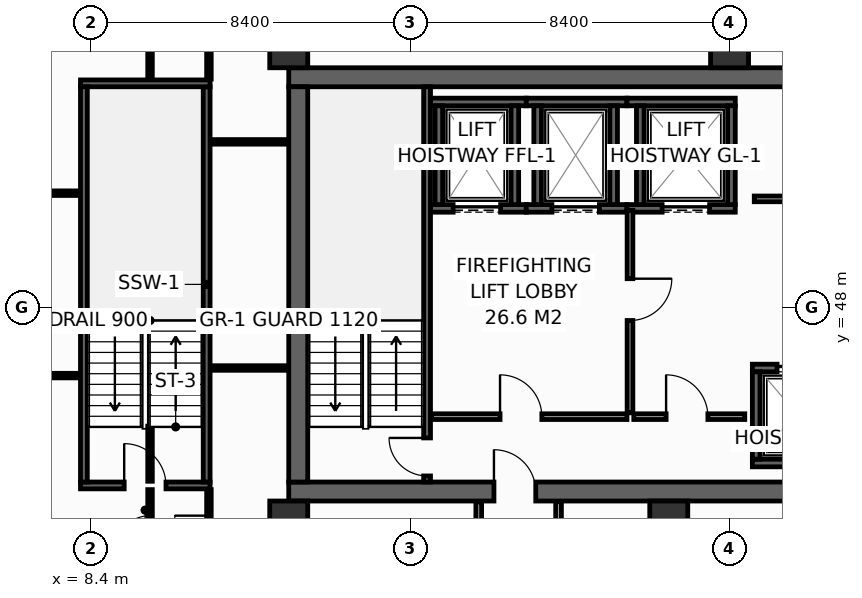
"""IFC4 building model, lengths in metres.
Left out: names, types, materials, properties, quantities, classifications, styles, units other than length and angle.
Written with IfcOpenShell. Run it as: python <this file> out.ifc"""

import sys

from ifc_helpers import new_model, si_unit, direction, frame, frame_2d, origin, origin_2d, place, context, subcontext, project, spatial, rectangle, hollow_rectangle, extrude, element, fill, save


model = new_model("IFC4")
c1 = context("Model", 3, precision=1e-05, world=origin(), true_north=direction((0.0, 1.0)))
c2 = subcontext(c1, "Body", "Model", "MODEL_VIEW")
j1 = project(units=[si_unit("LENGTHUNIT", "METRE"), si_unit("PLANEANGLEUNIT", "RADIAN")], contexts=[c1])
p1 = place(None, origin())
s1 = spatial("IfcSite", under=j1, at=p1, CompositionType="ELEMENT")
p2 = place(p1, origin())
s2 = spatial("IfcBuilding", under=s1, at=p2, CompositionType="ELEMENT")
p3 = place(p2, frame((0.0, 0.0, 160.0)))
s3 = spatial("IfcBuildingStorey", under=s2, at=p3, CompositionType="ELEMENT", Elevation=160.0)
p4 = place(p3, frame((13.6, 43.15, 0.0), z_axis=(0.0, 0.0, 1.0), x_axis=(1.0, 0.0, 0.0)))
e1 = element("IfcWall", 1, at=p4, inside=s3, PredefinedType="SHEAR", context=c2, shape_type="SweptSolid", body=[
    extrude(rectangle(XDim=32.7, YDim=0.5, at=frame_2d((16.35, 0.0))), origin(), (0.0, 0.0, 1.0), 3.55),
])
p5 = place(p4, frame((5.4, 0.0, 0.0)))
e2 = element("IfcOpeningElement", 2, at=p5, cuts=e1, PredefinedType="OPENING", context=c2, shape_type="SweptSolid", body=[
    extrude(rectangle(XDim=1.1, YDim=2.15, at=frame_2d((0.55, 1.075))), frame((0.0, 0.26, 0.0), z_axis=(0.0, -1.0, 0.0), x_axis=(1.0, 0.0, 0.0)), (0.0, 0.0, 1.0), 0.52),
])
p6 = place(p4, frame((25.6, 0.0, 0.0)))
e3 = element("IfcOpeningElement", 3, at=p6, cuts=e1, PredefinedType="OPENING", context=c2, shape_type="SweptSolid", body=[
    extrude(rectangle(XDim=1.1, YDim=2.15, at=frame_2d((0.55, 1.075))), frame((0.0, 0.26, 0.0), z_axis=(0.0, -1.0, 0.0), x_axis=(1.0, 0.0, 0.0)), (0.0, 0.0, 1.0), 0.52),
])
p7 = place(p3, frame((13.6, 54.05, 0.0), z_axis=(0.0, 0.0, 1.0), x_axis=(1.0, 0.0, 0.0)))
e4 = element("IfcWall", 4, at=p7, inside=s3, PredefinedType="SHEAR", context=c2, shape_type="SweptSolid", body=[
    extrude(rectangle(XDim=32.7, YDim=0.5, at=frame_2d((16.35, 0.0))), origin(), (0.0, 0.0, 1.0), 3.55),
])
p8 = place(p3, frame((13.85, 43.4, 0.0), z_axis=(0.0, 0.0, 1.0), x_axis=(0.0, 1.0, 0.0)))
e5 = element("IfcWall", 5, at=p8, inside=s3, PredefinedType="SHEAR", context=c2, shape_type="SweptSolid", body=[
    extrude(rectangle(XDim=10.4, YDim=0.5, at=frame_2d((5.2, 0.0))), origin(), (0.0, 0.0, 1.0), 3.55),
])
for number, where, z_axis, x_axis in (
    (6, (13.6, 54.8, 0.0), (0.0, 0.0, 1.0), (1.0, 0.0, 0.0)),
    (7, (25.2, 54.8, 0.0), (0.0, 0.0, 1.0), (1.0, 0.0, 0.0)),
    (8, (13.6, 42.4, 0.0), (0.0, 0.0, 1.0), (1.0, 0.0, 0.0)),
    (9, (23.6, 42.4, 0.0), (0.0, 0.0, 1.0), (1.0, 0.0, 0.0)),
):
    element("IfcColumn", number, at=place(p3, frame(where, z_axis=z_axis, x_axis=x_axis)), inside=s3, PredefinedType="COLUMN", context=c2, shape_type="SweptSolid", body=[
        extrude(hollow_rectangle(XDim=1.0, YDim=1.0, WallThickness=0.045, at=origin_2d()), origin(), (0.0, 0.0, 1.0), 3.8),
    ])
p9 = place(p3, frame((17.33, 50.6, 0.0), z_axis=(0.0, 0.0, 1.0), x_axis=(1.0, 0.0, 0.0)))
e10 = element("IfcWall", 10, at=p9, inside=s3, PredefinedType="SHEAR", context=c2, shape_type="SweptSolid", body=[
    extrude(rectangle(XDim=2.52, YDim=0.2, at=frame_2d((1.26, 0.0))), origin(), (0.0, 0.0, 1.0), 3.55),
])
p10 = place(p9, frame((0.595, 0.0, 0.0)))
e11 = element("IfcOpeningElement", 11, at=p10, cuts=e10, PredefinedType="OPENING", context=c2, shape_type="SweptSolid", body=[
    extrude(rectangle(XDim=1.25, YDim=2.3, at=frame_2d((0.625, 1.15))), frame((0.0, 0.11, 0.0), z_axis=(0.0, -1.0, 0.0), x_axis=(1.0, 0.0, 0.0)), (0.0, 0.0, 1.0), 0.22),
])
p11 = place(p3, frame((17.33, 53.4, 0.0), z_axis=(0.0, 0.0, 1.0), x_axis=(1.0, 0.0, 0.0)))
e12 = element("IfcWall", 12, at=p11, inside=s3, PredefinedType="SHEAR", context=c2, shape_type="SweptSolid", body=[
    extrude(rectangle(XDim=2.52, YDim=0.2, at=frame_2d((1.26, 0.0))), origin(), (0.0, 0.0, 1.0), 3.55),
])
for number, where, z_axis, x_axis in (
    (13, (17.55, 50.7, 0.0), (0.0, 0.0, 1.0), (0.0, 1.0, 0.0)),
    (14, (19.55, 50.7, 0.0), (0.0, 0.0, 1.0), (0.0, 1.0, 0.0)),
):
    element("IfcWall", number, at=place(p3, frame(where, z_axis=z_axis, x_axis=x_axis)), inside=s3, PredefinedType="SHEAR", context=c2, shape_type="SweptSolid", body=[
        extrude(rectangle(XDim=2.6, YDim=0.2, at=frame_2d((1.3, 0.0))), origin(), (0.0, 0.0, 1.0), 3.55),
    ])
p12 = place(p3, frame((19.85, 50.6, 0.0), z_axis=(0.0, 0.0, 1.0), x_axis=(1.0, 0.0, 0.0)))
e15 = element("IfcWall", 15, at=p12, inside=s3, PredefinedType="SHEAR", context=c2, shape_type="SweptSolid", body=[
    extrude(rectangle(XDim=2.65, YDim=0.2, at=frame_2d((1.325, 0.0))), origin(), (0.0, 0.0, 1.0), 3.55),
])
p13 = place(p12, frame((0.675, 0.0, 0.0)))
e16 = element("IfcOpeningElement", 16, at=p13, cuts=e15, PredefinedType="OPENING", context=c2, shape_type="SweptSolid", body=[
    extrude(rectangle(XDim=1.25, YDim=2.3, at=frame_2d((0.625, 1.15))), frame((0.0, 0.11, 0.0), z_axis=(0.0, -1.0, 0.0), x_axis=(1.0, 0.0, 0.0)), (0.0, 0.0, 1.0), 0.22),
])
p14 = place(p3, frame((19.85, 53.4, 0.0), z_axis=(0.0, 0.0, 1.0), x_axis=(1.0, 0.0, 0.0)))
e17 = element("IfcWall", 17, at=p14, inside=s3, PredefinedType="SHEAR", context=c2, shape_type="SweptSolid", body=[
    extrude(rectangle(XDim=2.65, YDim=0.2, at=frame_2d((1.325, 0.0))), origin(), (0.0, 0.0, 1.0), 3.55),
])
for number, where, z_axis, x_axis in (
    (18, (20.15, 50.7, 0.0), (0.0, 0.0, 1.0), (0.0, 1.0, 0.0)),
    (19, (22.15, 50.7, 0.0), (0.0, 0.0, 1.0), (0.0, 1.0, 0.0)),
):
    element("IfcWall", number, at=place(p3, frame(where, z_axis=z_axis, x_axis=x_axis)), inside=s3, PredefinedType="SHEAR", context=c2, shape_type="SweptSolid", body=[
        extrude(rectangle(XDim=2.6, YDim=0.2, at=frame_2d((1.3, 0.0))), origin(), (0.0, 0.0, 1.0), 3.55),
    ])
p15 = place(p3, frame((22.5, 50.6, 0.0), z_axis=(0.0, 0.0, 1.0), x_axis=(1.0, 0.0, 0.0)))
e20 = element("IfcWall", 20, at=p15, inside=s3, PredefinedType="SHEAR", context=c2, shape_type="SweptSolid", body=[
    extrude(rectangle(XDim=2.85, YDim=0.2, at=frame_2d((1.425, 0.0))), origin(), (0.0, 0.0, 1.0), 3.55),
])
p16 = place(p15, frame((0.925, 0.0, 0.0)))
e21 = element("IfcOpeningElement", 21, at=p16, cuts=e20, PredefinedType="OPENING", context=c2, shape_type="SweptSolid", body=[
    extrude(rectangle(XDim=1.25, YDim=2.3, at=frame_2d((0.625, 1.15))), frame((0.0, 0.11, 0.0), z_axis=(0.0, -1.0, 0.0), x_axis=(1.0, 0.0, 0.0)), (0.0, 0.0, 1.0), 0.22),
])
p17 = place(p3, frame((22.5, 53.4, 0.0), z_axis=(0.0, 0.0, 1.0), x_axis=(1.0, 0.0, 0.0)))
e22 = element("IfcWall", 22, at=p17, inside=s3, PredefinedType="SHEAR", context=c2, shape_type="SweptSolid", body=[
    extrude(rectangle(XDim=2.85, YDim=0.2, at=frame_2d((1.425, 0.0))), origin(), (0.0, 0.0, 1.0), 3.55),
])
for number, where, z_axis, x_axis in (
    (23, (22.85, 50.7, 0.0), (0.0, 0.0, 1.0), (0.0, 1.0, 0.0)),
    (24, (25.25, 50.7, 0.0), (0.0, 0.0, 1.0), (0.0, 1.0, 0.0)),
):
    element("IfcWall", number, at=place(p3, frame(where, z_axis=z_axis, x_axis=x_axis)), inside=s3, PredefinedType="SHEAR", context=c2, shape_type="SweptSolid", body=[
        extrude(rectangle(XDim=2.6, YDim=0.2, at=frame_2d((1.3, 0.0))), origin(), (0.0, 0.0, 1.0), 3.55),
    ])
p18 = place(p3, frame((25.8, 43.9, 0.0), z_axis=(0.0, 0.0, 1.0), x_axis=(1.0, 0.0, 0.0)))
e25 = element("IfcWall", 25, at=p18, inside=s3, PredefinedType="SHEAR", context=c2, shape_type="SweptSolid", body=[
    extrude(rectangle(XDim=2.575, YDim=0.2, at=frame_2d((1.288, 0.0))), origin(), (0.0, 0.0, 1.0), 3.55),
])
p19 = place(p3, frame((25.8, 46.4, 0.0), z_axis=(0.0, 0.0, 1.0), x_axis=(1.0, 0.0, 0.0)))
e26 = element("IfcWall", 26, at=p19, inside=s3, PredefinedType="SHEAR", context=c2, shape_type="SweptSolid", body=[
    extrude(rectangle(XDim=2.575, YDim=0.2, at=frame_2d((1.288, 0.0))), origin(), (0.0, 0.0, 1.0), 3.55),
])
p20 = place(p19, frame((0.65, 0.0, 0.0)))
e27 = element("IfcOpeningElement", 27, at=p20, cuts=e26, PredefinedType="OPENING", context=c2, shape_type="SweptSolid", body=[
    extrude(rectangle(XDim=1.1, YDim=2.2, at=frame_2d((0.55, 1.1))), frame((0.0, 0.11, 0.0), z_axis=(0.0, -1.0, 0.0), x_axis=(1.0, 0.0, 0.0)), (0.0, 0.0, 1.0), 0.22),
])
p21 = place(p3, frame((25.9, 44.0, 0.0), z_axis=(0.0, 0.0, 1.0), x_axis=(0.0, 1.0, 0.0)))
e28 = element("IfcWall", 28, at=p21, inside=s3, PredefinedType="SHEAR", context=c2, shape_type="SweptSolid", body=[
    extrude(rectangle(XDim=2.3, YDim=0.2, at=frame_2d((1.15, 0.0))), origin(), (0.0, 0.0, 1.0), 3.55),
])
p22 = place(p3, frame((17.24, 43.4, 0.0), z_axis=(0.0, 0.0, 1.0), x_axis=(0.0, 1.0, 0.0)))
e29 = element("IfcWall", 29, at=p22, inside=s3, PredefinedType="SHEAR", context=c2, shape_type="SweptSolid", body=[
    extrude(rectangle(XDim=10.4, YDim=0.18, at=frame_2d((5.2, 0.0))), origin(), (0.0, 0.0, 1.0), 3.55),
])
p23 = place(p22, frame((0.16, 0.0, 0.0)))
e30 = element("IfcOpeningElement", 30, at=p23, cuts=e29, PredefinedType="OPENING", context=c2, shape_type="SweptSolid", body=[
    extrude(rectangle(XDim=1.0, YDim=2.15, at=frame_2d((0.5, 1.075))), frame((0.0, 0.1, 0.0), z_axis=(0.0, -1.0, 0.0), x_axis=(1.0, 0.0, 0.0)), (0.0, 0.0, 1.0), 0.2),
])
p24 = place(p3, frame((8.12, 43.31, 0.0), z_axis=(0.0, 0.0, 1.0), x_axis=(1.0, 0.0, 0.0)))
e31 = element("IfcWall", 31, at=p24, inside=s3, PredefinedType="SHEAR", context=c2, shape_type="SweptSolid", body=[
    extrude(rectangle(XDim=3.41, YDim=0.18, at=frame_2d((1.705, 0.0))), origin(), (0.0, 0.0, 1.0), 3.55),
])
p25 = place(p24, frame((1.15, 0.0, 0.0)))
e32 = element("IfcOpeningElement", 32, at=p25, cuts=e31, PredefinedType="OPENING", context=c2, shape_type="SweptSolid", body=[
    extrude(rectangle(XDim=1.1, YDim=2.15, at=frame_2d((0.55, 1.075))), frame((0.0, 0.1, 0.0), z_axis=(0.0, -1.0, 0.0), x_axis=(1.0, 0.0, 0.0)), (0.0, 0.0, 1.0), 0.2),
])
p26 = place(p3, frame((11.44, 43.4, 0.0), z_axis=(0.0, 0.0, 1.0), x_axis=(0.0, 1.0, 0.0)))
e33 = element("IfcWall", 33, at=p26, inside=s3, PredefinedType="SHEAR", context=c2, shape_type="SweptSolid", body=[
    extrude(rectangle(XDim=10.4, YDim=0.18, at=frame_2d((5.2, 0.0))), origin(), (0.0, 0.0, 1.0), 3.55),
])
p27 = place(p3, frame((11.53, 53.89, 0.0), z_axis=(0.0, 0.0, 1.0), x_axis=(-1.0, 0.0, 0.0)))
e34 = element("IfcWall", 34, at=p27, inside=s3, PredefinedType="SHEAR", context=c2, shape_type="SweptSolid", body=[
    extrude(rectangle(XDim=3.41, YDim=0.18, at=frame_2d((1.705, 0.0))), origin(), (0.0, 0.0, 1.0), 3.55),
])
p28 = place(p3, frame((8.21, 53.8, 0.0), z_axis=(0.0, 0.0, 1.0), x_axis=(0.0, -1.0, 0.0)))
e35 = element("IfcWall", 35, at=p28, inside=s3, PredefinedType="SHEAR", context=c2, shape_type="SweptSolid", body=[
    extrude(rectangle(XDim=10.4, YDim=0.18, at=frame_2d((5.2, 0.0))), origin(), (0.0, 0.0, 1.0), 3.55),
])
p29 = place(p3, frame((17.36, 45.12, 0.0), z_axis=(0.0, 0.0, 1.0), x_axis=(1.0, 0.0, 0.0)))
e36 = element("IfcWall", 36, at=p29, inside=s3, PredefinedType="PARTITIONING", context=c2, shape_type="SweptSolid", body=[
    extrude(rectangle(XDim=5.14, YDim=0.15, at=frame_2d((2.57, 0.0))), origin(), (0.0, 0.0, 1.0), 3.55),
])
p30 = place(p29, frame((1.8, 0.0, 0.0)))
e37 = element("IfcOpeningElement", 37, at=p30, cuts=e36, PredefinedType="OPENING", context=c2, shape_type="SweptSolid", body=[
    extrude(rectangle(XDim=1.1, YDim=2.15, at=frame_2d((0.55, 1.075))), frame((0.0, 0.085, 0.0), z_axis=(0.0, -1.0, 0.0), x_axis=(1.0, 0.0, 0.0)), (0.0, 0.0, 1.0), 0.17),
])
p31 = place(p3, frame((22.58, 50.55, 0.0), z_axis=(0.0, 0.0, 1.0), x_axis=(0.0, -1.0, 0.0)))
e38 = element("IfcWall", 38, at=p31, inside=s3, PredefinedType="PARTITIONING", context=c2, shape_type="SweptSolid", body=[
    extrude(rectangle(XDim=5.33, YDim=0.15, at=frame_2d((2.665, 0.0))), origin(), (0.0, 0.0, 1.0), 3.55),
])
p32 = place(p31, frame((1.8, 0.0, 0.0)))
e39 = element("IfcOpeningElement", 39, at=p32, cuts=e38, PredefinedType="OPENING", context=c2, shape_type="SweptSolid", body=[
    extrude(rectangle(XDim=1.1, YDim=2.15, at=frame_2d((0.55, 1.075))), frame((0.0, 0.085, 0.0), z_axis=(0.0, -1.0, 0.0), x_axis=(1.0, 0.0, 0.0)), (0.0, 0.0, 1.0), 0.17),
])
p33 = place(p3, frame((22.68, 45.12, 0.0), z_axis=(0.0, 0.0, 1.0), x_axis=(1.0, 0.0, 0.0)))
e40 = element("IfcWall", 40, at=p33, inside=s3, PredefinedType="PARTITIONING", context=c2, shape_type="SweptSolid", body=[
    extrude(rectangle(XDim=2.92, YDim=0.15, at=frame_2d((1.46, 0.0))), origin(), (0.0, 0.0, 1.0), 3.55),
])
p34 = place(p33, frame((0.85, 0.0, 0.0)))
e41 = element("IfcOpeningElement", 41, at=p34, cuts=e40, PredefinedType="OPENING", context=c2, shape_type="SweptSolid", body=[
    extrude(rectangle(XDim=1.1, YDim=2.15, at=frame_2d((0.55, 1.075))), frame((0.0, 0.085, 0.0), z_axis=(0.0, -1.0, 0.0), x_axis=(1.0, 0.0, 0.0)), (0.0, 0.0, 1.0), 0.17),
])
p35 = place(p3, frame((25.85, 50.85, 0.0), z_axis=(0.0, 0.0, 1.0), x_axis=(1.0, 0.0, 0.0)))
e42 = element("IfcWall", 42, at=p35, inside=s3, PredefinedType="PARTITIONING", context=c2, shape_type="SweptSolid", body=[
    extrude(rectangle(XDim=7.65, YDim=0.15, at=frame_2d((3.825, 0.0))), origin(), (0.0, 0.0, 1.0), 3.55),
])
p36 = place(p35, frame((1.25, 0.0, 0.0)))
e43 = element("IfcOpeningElement", 43, at=p36, cuts=e42, PredefinedType="OPENING", context=c2, shape_type="SweptSolid", body=[
    extrude(rectangle(XDim=0.95, YDim=2.15, at=frame_2d((0.475, 1.075))), frame((0.0, 0.085, 0.0), z_axis=(0.0, -1.0, 0.0), x_axis=(1.0, 0.0, 0.0)), (0.0, 0.0, 1.0), 0.17),
])
p37 = place(p3, frame((11.55, 52.35, 0.0), z_axis=(0.0, 0.0, 1.0), x_axis=(1.0, 0.0, 0.0)))
e44 = element("IfcWall", 44, at=p37, inside=s3, PredefinedType="PARTITIONING", context=c2, shape_type="SweptSolid", body=[
    extrude(rectangle(XDim=2.03, YDim=0.12, at=frame_2d((1.015, 0.0))), origin(), (0.0, 0.0, 1.0), 3.55),
])
p38 = place(p3, frame((11.5, 54.0, 0.0), z_axis=(0.0, 0.0, 1.0), x_axis=(0.0, 1.0, 0.0)))
e45 = element("IfcWall", 45, at=p38, inside=s3, PredefinedType="PARTITIONING", context=c2, shape_type="SweptSolid", body=[
    extrude(rectangle(XDim=1.995, YDim=0.12, at=frame_2d((0.998, 0.0))), origin(), (0.0, 0.0, 1.0), 2.935),
])
p39 = place(p3, frame((5.102, 46.2, 0.0), z_axis=(0.0, 0.0, 1.0), x_axis=(1.0, 0.0, 0.0)))
e46 = element("IfcWall", 46, at=p39, inside=s3, PredefinedType="PARTITIONING", context=c2, shape_type="SweptSolid", body=[
    extrude(rectangle(XDim=2.998, YDim=0.12, at=frame_2d((1.499, 0.0))), origin(), (0.0, 0.0, 1.0), 2.835),
])
p40 = place(p3, frame((4.304, 51.0, 0.0), z_axis=(0.0, 0.0, 1.0), x_axis=(1.0, 0.0, 0.0)))
e47 = element("IfcWall", 47, at=p40, inside=s3, PredefinedType="PARTITIONING", context=c2, shape_type="SweptSolid", body=[
    extrude(rectangle(XDim=3.796, YDim=0.12, at=frame_2d((1.898, 0.0))), origin(), (0.0, 0.0, 1.0), 2.835),
])
p41 = place(p3, frame((9.95, 40.93, 0.0), z_axis=(0.0, 0.0, 1.0), x_axis=(0.0, 1.0, 0.0)))
e48 = element("IfcWall", 48, at=p41, inside=s3, PredefinedType="PARTITIONING", context=c2, shape_type="SweptSolid", body=[
    extrude(rectangle(XDim=2.27, YDim=0.12, at=frame_2d((1.135, 0.0))), origin(), (0.0, 0.0, 1.0), 2.835),
])
p42 = place(p41, frame((0.685, 0.0, 0.0)))
e49 = element("IfcOpeningElement", 49, at=p42, cuts=e48, PredefinedType="OPENING", context=c2, shape_type="SweptSolid", body=[
    extrude(rectangle(XDim=0.9, YDim=2.1, at=frame_2d((0.45, 1.05))), frame((0.0, 0.07, 0.0), z_axis=(0.0, -1.0, 0.0), x_axis=(1.0, 0.0, 0.0)), (0.0, 0.0, 1.0), 0.14),
])
p43 = place(p3, frame((9.95, 43.42, 0.0), z_axis=(0.0, 0.0, 1.0), x_axis=(0.0, 1.0, 0.0)))
e50 = element("IfcWall", 50, at=p43, inside=s3, PredefinedType="PARTITIONING", context=c2, shape_type="SweptSolid", body=[
    extrude(rectangle(XDim=1.45, YDim=0.12, at=frame_2d((0.725, 0.0))), origin(), (0.0, 0.0, 1.0), 3.55),
])
p44 = place(p3, frame((9.95, 54.0, 0.0), z_axis=(0.0, 0.0, 1.0), x_axis=(0.0, 1.0, 0.0)))
e51 = element("IfcWall", 51, at=p44, inside=s3, PredefinedType="PARTITIONING", context=c2, shape_type="SweptSolid", body=[
    extrude(rectangle(XDim=1.995, YDim=0.12, at=frame_2d((0.998, 0.0))), origin(), (0.0, 0.0, 1.0), 2.935),
])
p45 = place(p3, frame((11.55, 46.4, 0.0), z_axis=(0.0, 0.0, 1.0), x_axis=(1.0, 0.0, 0.0)))
e52 = element("IfcWall", 52, at=p45, inside=s3, PredefinedType="PARTITIONING", context=c2, shape_type="SweptSolid", body=[
    extrude(rectangle(XDim=2.03, YDim=0.12, at=frame_2d((1.015, 0.0))), origin(), (0.0, 0.0, 1.0), 3.55),
])
p46 = place(p3, frame((11.5, 40.93, 0.0), z_axis=(0.0, 0.0, 1.0), x_axis=(0.0, 1.0, 0.0)))
e53 = element("IfcWall", 53, at=p46, inside=s3, PredefinedType="PARTITIONING", context=c2, shape_type="SweptSolid", body=[
    extrude(rectangle(XDim=2.27, YDim=0.12, at=frame_2d((1.135, 0.0))), origin(), (0.0, 0.0, 1.0), 2.835),
])
p47 = place(p46, frame((0.685, 0.0, 0.0)))
e54 = element("IfcOpeningElement", 54, at=p47, cuts=e53, PredefinedType="OPENING", context=c2, shape_type="SweptSolid", body=[
    extrude(rectangle(XDim=0.9, YDim=2.1, at=frame_2d((0.45, 1.05))), frame((0.0, 0.07, 0.0), z_axis=(0.0, -1.0, 0.0), x_axis=(1.0, 0.0, 0.0)), (0.0, 0.0, 1.0), 0.14),
])
p48 = place(p3, frame((13.8, 40.93, 0.0), z_axis=(0.0, 0.0, 1.0), x_axis=(0.0, 1.0, 0.0)))
e55 = element("IfcWall", 55, at=p48, inside=s3, PredefinedType="PARTITIONING", context=c2, shape_type="SweptSolid", body=[
    extrude(rectangle(XDim=1.95, YDim=0.15, at=frame_2d((0.975, 0.0))), origin(), (0.0, 0.0, 1.0), 3.55),
])
for number, where, z_axis, x_axis in (
    (56, (18.6, 40.85, 0.0), (0.0, 0.0, 1.0), (0.0, 1.0, 0.0)),
    (57, (20.7, 40.85, 0.0), (0.0, 0.0, 1.0), (0.0, 1.0, 0.0)),
):
    element("IfcWall", number, at=place(p3, frame(where, z_axis=z_axis, x_axis=x_axis)), inside=s3, PredefinedType="PARTITIONING", context=c2, shape_type="SweptSolid", body=[
        extrude(rectangle(XDim=2.03, YDim=0.15, at=frame_2d((1.015, 0.0))), origin(), (0.0, 0.0, 1.0), 3.55),
    ])
p49 = place(p10, origin())
e58 = element("IfcDoor", 58, at=p49, inside=s3, OperationType="SLIDING_TO_LEFT", PredefinedType="DOOR", context=c2, shape_type="SweptSolid", body=[
    extrude(rectangle(XDim=1.25, YDim=2.3, at=frame_2d((0.625, 1.15))), frame((0.0, 0.025, 0.0), z_axis=(0.0, -1.0, 0.0), x_axis=(1.0, 0.0, 0.0)), (0.0, 0.0, 1.0), 0.05),
])
fill(e11, e58)
p50 = place(p13, origin())
e59 = element("IfcDoor", 59, at=p50, inside=s3, OperationType="SLIDING_TO_LEFT", PredefinedType="DOOR", context=c2, shape_type="SweptSolid", body=[
    extrude(rectangle(XDim=1.25, YDim=2.3, at=frame_2d((0.625, 1.15))), frame((0.0, 0.025, 0.0), z_axis=(0.0, -1.0, 0.0), x_axis=(1.0, 0.0, 0.0)), (0.0, 0.0, 1.0), 0.05),
])
fill(e16, e59)
p51 = place(p16, origin())
e60 = element("IfcDoor", 60, at=p51, inside=s3, OperationType="SLIDING_TO_LEFT", PredefinedType="DOOR", context=c2, shape_type="SweptSolid", body=[
    extrude(rectangle(XDim=1.25, YDim=2.3, at=frame_2d((0.625, 1.15))), frame((0.0, 0.025, 0.0), z_axis=(0.0, -1.0, 0.0), x_axis=(1.0, 0.0, 0.0)), (0.0, 0.0, 1.0), 0.05),
])
fill(e21, e60)
p52 = place(p20, origin())
e61 = element("IfcDoor", 61, at=p52, inside=s3, OperationType="SLIDING_TO_LEFT", PredefinedType="DOOR", context=c2, shape_type="SweptSolid", body=[
    extrude(rectangle(XDim=1.1, YDim=2.2, at=frame_2d((0.55, 1.1))), frame((0.0, 0.025, 0.0), z_axis=(0.0, -1.0, 0.0), x_axis=(1.0, 0.0, 0.0)), (0.0, 0.0, 1.0), 0.05),
])
fill(e27, e61)
p53 = place(p23, origin())
e62 = element("IfcDoor", 62, at=p53, inside=s3, OperationType="SINGLE_SWING_RIGHT", PredefinedType="DOOR", context=c2, shape_type="SweptSolid", body=[
    extrude(rectangle(XDim=1.0, YDim=2.15, at=frame_2d((0.5, 1.075))), frame((0.0, 0.025, 0.0), z_axis=(0.0, -1.0, 0.0), x_axis=(1.0, 0.0, 0.0)), (0.0, 0.0, 1.0), 0.05),
])
fill(e30, e62)
p54 = place(p25, origin())
e63 = element("IfcDoor", 63, at=p54, inside=s3, OperationType="SINGLE_SWING_LEFT", PredefinedType="DOOR", context=c2, shape_type="SweptSolid", body=[
    extrude(rectangle(XDim=1.1, YDim=2.15, at=frame_2d((0.55, 1.075))), frame((0.0, 0.025, 0.0), z_axis=(0.0, -1.0, 0.0), x_axis=(1.0, 0.0, 0.0)), (0.0, 0.0, 1.0), 0.05),
])
fill(e32, e63)
p55 = place(p30, origin())
e64 = element("IfcDoor", 64, at=p55, inside=s3, OperationType="SINGLE_SWING_LEFT", PredefinedType="DOOR", context=c2, shape_type="SweptSolid", body=[
    extrude(rectangle(XDim=1.1, YDim=2.15, at=frame_2d((0.55, 1.075))), frame((0.0, 0.025, 0.0), z_axis=(0.0, -1.0, 0.0), x_axis=(1.0, 0.0, 0.0)), (0.0, 0.0, 1.0), 0.05),
])
fill(e37, e64)
p56 = place(p32, origin())
e65 = element("IfcDoor", 65, at=p56, inside=s3, OperationType="SINGLE_SWING_LEFT", PredefinedType="DOOR", context=c2, shape_type="SweptSolid", body=[
    extrude(rectangle(XDim=1.1, YDim=2.15, at=frame_2d((0.55, 1.075))), frame((0.0, 0.025, 0.0), z_axis=(0.0, -1.0, 0.0), x_axis=(1.0, 0.0, 0.0)), (0.0, 0.0, 1.0), 0.05),
])
fill(e39, e65)
p57 = place(p34, origin())
e66 = element("IfcDoor", 66, at=p57, inside=s3, OperationType="SINGLE_SWING_LEFT", PredefinedType="DOOR", context=c2, shape_type="SweptSolid", body=[
    extrude(rectangle(XDim=1.1, YDim=2.15, at=frame_2d((0.55, 1.075))), frame((0.0, 0.025, 0.0), z_axis=(0.0, -1.0, 0.0), x_axis=(1.0, 0.0, 0.0)), (0.0, 0.0, 1.0), 0.05),
])
fill(e41, e66)
p58 = place(p5, origin())
e67 = element("IfcDoor", 67, at=p58, inside=s3, OperationType="SINGLE_SWING_LEFT", PredefinedType="DOOR", context=c2, shape_type="SweptSolid", body=[
    extrude(rectangle(XDim=1.1, YDim=2.15, at=frame_2d((0.55, 1.075))), frame((0.0, 0.025, 0.0), z_axis=(0.0, -1.0, 0.0), x_axis=(1.0, 0.0, 0.0)), (0.0, 0.0, 1.0), 0.05),
])
fill(e2, e67)
p59 = place(p42, origin())
e68 = element("IfcDoor", 68, at=p59, inside=s3, OperationType="SINGLE_SWING_LEFT", PredefinedType="DOOR", context=c2, shape_type="SweptSolid", body=[
    extrude(rectangle(XDim=0.9, YDim=2.1, at=frame_2d((0.45, 1.05))), frame((0.0, 0.025, 0.0), z_axis=(0.0, -1.0, 0.0), x_axis=(1.0, 0.0, 0.0)), (0.0, 0.0, 1.0), 0.05),
])
fill(e49, e68)
p60 = place(p47, origin())
e69 = element("IfcDoor", 69, at=p60, inside=s3, OperationType="SINGLE_SWING_RIGHT", PredefinedType="DOOR", context=c2, shape_type="SweptSolid", body=[
    extrude(rectangle(XDim=0.9, YDim=2.1, at=frame_2d((0.45, 1.05))), frame((0.0, 0.025, 0.0), z_axis=(0.0, -1.0, 0.0), x_axis=(1.0, 0.0, 0.0)), (0.0, 0.0, 1.0), 0.05),
])
fill(e54, e69)
save(model, sys.argv[1])
